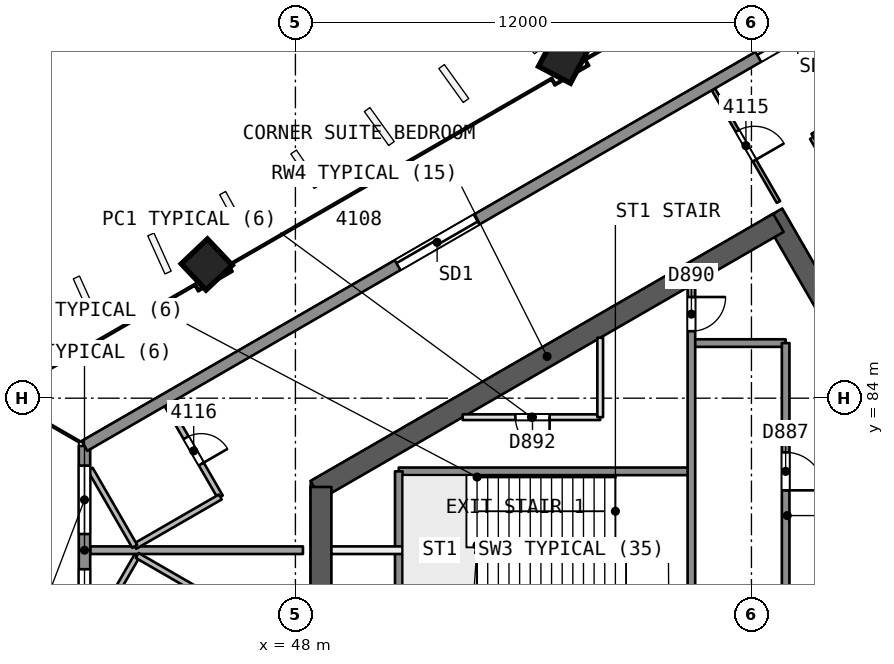
"""IFC4 building model, lengths in metres.
Left out: names, types, materials, properties, quantities, classifications, styles, units other than length and angle.
Written with IfcOpenShell. Run it as: python <this file> out.ifc"""

import sys

from ifc_helpers import new_model, si_unit, direction, frame, frame_2d, origin, origin_2d, place, context, subcontext, project, spatial, rectangle, extrude, element, fill, save


model = new_model("IFC4")
c1 = context("Model", 3, precision=1e-05, world=origin(), true_north=direction((0.0, 1.0)))
c2 = subcontext(c1, "Body", "Model", "MODEL_VIEW")
j1 = project(units=[si_unit("LENGTHUNIT", "METRE"), si_unit("PLANEANGLEUNIT", "RADIAN")], contexts=[c1])
p1 = place(None, origin())
s1 = spatial("IfcSite", under=j1, at=p1, CompositionType="ELEMENT")
p2 = place(p1, origin())
s2 = spatial("IfcBuilding", under=s1, at=p2, CompositionType="ELEMENT")
p3 = place(p2, frame((0.0, 0.0, 171.1)))
s3 = spatial("IfcBuildingStorey", under=s2, at=p3, CompositionType="ELEMENT", Elevation=171.1)
p4 = place(p3, frame((65.682, 80.0, 0.0), z_axis=(0.0, 0.0, 1.0), x_axis=(-0.500000202252, 0.866025287014, 0.0)))
e1 = element("IfcWall", 1, at=p4, inside=s3, PredefinedType="SHEAR", context=c2, shape_type="SweptSolid", body=[
    extrude(rectangle(XDim=10.221, YDim=0.55, at=frame_2d((5.111, 0.0))), origin(), (0.0, 0.0, 1.0), 3.7),
])
p5 = place(p4, frame((0.791, 0.0, 0.0)))
e2 = element("IfcOpeningElement", 2, at=p5, cuts=e1, PredefinedType="OPENING", context=c2, shape_type="SweptSolid", body=[
    extrude(rectangle(XDim=1.2, YDim=2.1, at=frame_2d((0.6, 1.05))), frame((0.0, 0.286, 0.0), z_axis=(0.0, -1.0, 0.0), x_axis=(1.0, 0.0, 0.0)), (0.0, 0.0, 1.0), 0.571),
])
p6 = place(p3, frame((60.709, 88.614, 0.0), z_axis=(0.0, 0.0, 1.0), x_axis=(-0.866020164116, -0.500009075263, 0.0)))
e3 = element("IfcWall", 3, at=p6, inside=s3, PredefinedType="SHEAR", context=c2, shape_type="SweptSolid", body=[
    extrude(rectangle(XDim=14.058, YDim=0.55, at=frame_2d((7.029, 0.0))), origin(), (0.0, 0.0, 1.0), 3.7),
])
p7 = place(p3, frame((48.672, 81.664, 0.0), z_axis=(0.0, 0.0, 1.0), x_axis=(0.0, -1.0, 0.0)))
e4 = element("IfcWall", 4, at=p7, inside=s3, PredefinedType="SHEAR", context=c2, shape_type="SweptSolid", body=[
    extrude(rectangle(XDim=3.487, YDim=0.55, at=frame_2d((1.743, 0.0))), origin(), (0.0, 0.0, 1.0), 3.7),
])
p8 = place(p3, frame((60.709, 71.386, 0.0), z_axis=(0.0, 0.0, 1.0), x_axis=(0.500015938302, 0.866016201606, 0.0)))
e5 = element("IfcWall", 5, at=p8, inside=s3, PredefinedType="SHEAR", context=c2, shape_type="SweptSolid", body=[
    extrude(rectangle(XDim=10.105, YDim=0.55, at=frame_2d((5.053, 0.0))), origin(), (0.0, 0.0, 1.0), 3.7),
])
p9 = place(p8, frame((7.955, 0.0, 0.0)))
e6 = element("IfcOpeningElement", 6, at=p9, cuts=e5, PredefinedType="OPENING", context=c2, shape_type="SweptSolid", body=[
    extrude(rectangle(XDim=1.2, YDim=2.1, at=frame_2d((0.6, 1.05))), frame((0.0, 0.286, 0.0), z_axis=(0.0, -1.0, 0.0), x_axis=(1.0, 0.0, 0.0)), (0.0, 0.0, 1.0), 0.571),
])
p10 = place(p3, frame((55.016, 92.943, 0.0), z_axis=(0.019328501455, -0.012204002625, 0.999738701537), x_axis=(-0.498087889239, 0.866890953389, 0.020212113357)))
e7 = element("IfcColumn", 7, at=p10, inside=s3, PredefinedType="COLUMN", context=c2, shape_type="SweptSolid", body=[
    extrude(rectangle(XDim=0.95, YDim=0.95, at=origin_2d()), origin(), (0.0, 0.0, 1.0), 3.701),
])
p11 = place(p3, frame((45.632, 87.526, 0.0), z_axis=(0.02855911485, -0.006793507689, 0.999569019734), x_axis=(-0.500407643461, 0.865554709988, 0.020180049142)))
e8 = element("IfcColumn", 8, at=p11, inside=s3, PredefinedType="COLUMN", context=c2, shape_type="SweptSolid", body=[
    extrude(rectangle(XDim=0.95, YDim=0.95, at=origin_2d()), origin(), (0.0, 0.0, 1.0), 3.702),
])
p12 = place(p3, frame((58.999, 92.126, 0.0), z_axis=(0.0, 0.0, 1.0), x_axis=(0.499981725576, -0.866035954271, 0.0)))
e9 = element("IfcWall", 9, at=p12, inside=s3, PredefinedType="PARTITIONING", context=c2, shape_type="SweptSolid", body=[
    extrude(rectangle(XDim=3.424, YDim=0.1, at=frame_2d((1.712, 0.0))), origin(), (0.0, 0.0, 1.0), 3.25),
])
p13 = place(p12, frame((1.262, 0.0, 0.0)))
e10 = element("IfcOpeningElement", 10, at=p13, cuts=e9, PredefinedType="OPENING", context=c2, shape_type="SweptSolid", body=[
    extrude(rectangle(XDim=0.9, YDim=2.1, at=frame_2d((0.45, 1.05))), frame((0.0, 0.061, 0.0), z_axis=(0.0, -1.0, 0.0), x_axis=(1.0, 0.0, 0.0)), (0.0, 0.0, 1.0), 0.121),
])
p14 = place(p3, frame((66.129, 83.077, 0.0), z_axis=(0.0, 0.0, 1.0), x_axis=(-0.5000018851, 0.866024315419, 0.0)))
e11 = element("IfcWall", 11, at=p14, inside=s3, PredefinedType="PARTITIONING", context=c2, shape_type="SweptSolid", body=[
    extrude(rectangle(XDim=9.0, YDim=0.2, at=frame_2d((4.5, 0.0))), origin(), (0.0, 0.0, 1.0), 3.25),
])
p15 = place(p3, frame((61.629, 90.871, 0.0), z_axis=(0.0, 0.0, 1.0), x_axis=(0.866041268327, 0.499972520799, 0.0)))
e12 = element("IfcWall", 12, at=p15, inside=s3, PredefinedType="PARTITIONING", context=c2, shape_type="SweptSolid", body=[
    extrude(rectangle(XDim=2.0, YDim=0.2, at=frame_2d((1.0, 0.0))), origin(), (0.0, 0.0, 1.0), 3.25),
])
p16 = place(p3, frame((44.623, 83.826, 0.0), z_axis=(0.0, 0.0, 1.0), x_axis=(0.500001639361, -0.866024457297, 0.0)))
e13 = element("IfcWall", 13, at=p16, inside=s3, PredefinedType="PARTITIONING", context=c2, shape_type="SweptSolid", body=[
    extrude(rectangle(XDim=2.801, YDim=0.15, at=frame_2d((1.4, 0.0))), origin(), (0.0, 0.0, 1.0), 3.25),
])
p17 = place(p16, frame((1.0, 0.0, 0.0)))
e14 = element("IfcOpeningElement", 14, at=p17, cuts=e13, PredefinedType="OPENING", context=c2, shape_type="SweptSolid", body=[
    extrude(rectangle(XDim=0.8, YDim=2.1, at=frame_2d((0.4, 1.05))), frame((0.0, 0.085, 0.0), z_axis=(0.0, -1.0, 0.0), x_axis=(1.0, 0.0, 0.0)), (0.0, 0.0, 1.0), 0.171),
])
p18 = place(p3, frame((46.023, 81.401, 0.0), z_axis=(0.0, 0.0, 1.0), x_axis=(-0.866021400173, -0.500006934395, 0.0)))
e15 = element("IfcWall", 15, at=p18, inside=s3, PredefinedType="PARTITIONING", context=c2, shape_type="SweptSolid", body=[
    extrude(rectangle(XDim=2.6, YDim=0.15, at=frame_2d((1.3, 0.0))), origin(), (0.0, 0.0, 1.0), 3.25),
])
p19 = place(p3, frame((43.771, 80.101, 0.0), z_axis=(0.0, 0.0, 1.0), x_axis=(-0.499989728273, 0.866031334088, 0.0)))
e16 = element("IfcWall", 16, at=p19, inside=s3, PredefinedType="PARTITIONING", context=c2, shape_type="SweptSolid", body=[
    extrude(rectangle(XDim=2.346, YDim=0.15, at=frame_2d((1.173, 0.0))), origin(), (0.0, 0.0, 1.0), 3.25),
])
p20 = place(p3, frame((42.599, 80.0, 0.0), z_axis=(0.0, 0.0, 1.0), x_axis=(1.0, 0.0, 0.0)))
e17 = element("IfcWall", 17, at=p20, inside=s3, PredefinedType="PARTITIONING", context=c2, shape_type="SweptSolid", body=[
    extrude(rectangle(XDim=5.599, YDim=0.2, at=frame_2d((2.8, 0.0))), origin(), (0.0, 0.0, 1.0), 3.25),
])
p21 = place(p3, frame((42.599, 77.718, 0.0), z_axis=(0.0, 0.0, 1.0), x_axis=(0.499978546328, 0.866037789714, 0.0)))
e18 = element("IfcWall", 18, at=p21, inside=s3, PredefinedType="PARTITIONING", context=c2, shape_type="SweptSolid", body=[
    extrude(rectangle(XDim=2.476, YDim=0.15, at=frame_2d((1.238, 0.0))), origin(), (0.0, 0.0, 1.0), 3.25),
])
p22 = place(p3, frame((43.836, 79.862, 0.0), z_axis=(0.0, 0.0, 1.0), x_axis=(0.866021400173, -0.500006934395, 0.0)))
e19 = element("IfcWall", 19, at=p22, inside=s3, PredefinedType="PARTITIONING", context=c2, shape_type="SweptSolid", body=[
    extrude(rectangle(XDim=2.6, YDim=0.15, at=frame_2d((1.3, 0.0))), origin(), (0.0, 0.0, 1.0), 3.25),
])
p23 = place(p3, frame((42.45, 77.256, 0.0), z_axis=(0.0, 0.0, 1.0), x_axis=(0.0, 1.0, 0.0)))
e20 = element("IfcWall", 20, at=p23, inside=s3, PredefinedType="SOLIDWALL", context=c2, shape_type="SweptSolid", body=[
    extrude(rectangle(XDim=5.487, YDim=0.3, at=frame_2d((2.744, 0.0))), origin(), (0.0, 0.0, 1.0), 3.25),
])
p24 = place(p23, frame((3.169, 0.0, 0.9)))
e21 = element("IfcOpeningElement", 21, at=p24, cuts=e20, PredefinedType="OPENING", context=c2, shape_type="SweptSolid", body=[
    extrude(rectangle(XDim=1.8, YDim=1.5, at=frame_2d((0.9, 0.75))), frame((0.0, 0.161, 0.0), z_axis=(0.0, -1.0, 0.0), x_axis=(1.0, 0.0, 0.0)), (0.0, 0.0, 1.0), 0.321),
])
p25 = place(p23, frame((0.443, 0.0, 0.9)))
e22 = element("IfcOpeningElement", 22, at=p25, cuts=e20, PredefinedType="OPENING", context=c2, shape_type="SweptSolid", body=[
    extrude(rectangle(XDim=1.8, YDim=1.5, at=frame_2d((0.9, 0.75))), frame((0.0, 0.161, 0.0), z_axis=(0.0, -1.0, 0.0), x_axis=(1.0, 0.0, 0.0)), (0.0, 0.0, 1.0), 0.321),
])
p26 = place(p3, frame((42.45, 82.744, 0.0), z_axis=(0.0, 0.0, 1.0), x_axis=(0.866024128163, 0.500002209434, 0.0)))
e23 = element("IfcWall", 23, at=p26, inside=s3, PredefinedType="SOLIDWALL", context=c2, shape_type="SweptSolid", body=[
    extrude(rectangle(XDim=53.635, YDim=0.3, at=frame_2d((26.817, 0.0))), origin(), (0.0, 0.0, 1.0), 3.25),
])
p27 = place(p26, frame((20.473, 0.0, 0.0)))
e24 = element("IfcOpeningElement", 24, at=p27, cuts=e23, PredefinedType="OPENING", context=c2, shape_type="SweptSolid", body=[
    extrude(rectangle(XDim=2.4, YDim=2.4, at=frame_2d((1.2, 1.2))), frame((0.0, 0.161, 0.0), z_axis=(0.0, -1.0, 0.0), x_axis=(1.0, 0.0, 0.0)), (0.0, 0.0, 1.0), 0.321),
])
p28 = place(p26, frame((9.514, 0.0, 0.0)))
e25 = element("IfcOpeningElement", 25, at=p28, cuts=e23, PredefinedType="OPENING", context=c2, shape_type="SweptSolid", body=[
    extrude(rectangle(XDim=2.4, YDim=2.4, at=frame_2d((1.2, 1.2))), frame((0.0, 0.161, 0.0), z_axis=(0.0, -1.0, 0.0), x_axis=(1.0, 0.0, 0.0)), (0.0, 0.0, 1.0), 0.321),
])
p29 = place(p26, frame((40.628, 0.0, 0.0)))
e26 = element("IfcOpeningElement", 26, at=p29, cuts=e23, PredefinedType="OPENING", context=c2, shape_type="SweptSolid", body=[
    extrude(rectangle(XDim=2.4, YDim=2.4, at=frame_2d((1.2, 1.2))), frame((0.0, 0.161, 0.0), z_axis=(0.0, -1.0, 0.0), x_axis=(1.0, 0.0, 0.0)), (0.0, 0.0, 1.0), 0.321),
])
p30 = place(p26, frame((27.632, 0.0, 0.9)))
e27 = element("IfcOpeningElement", 27, at=p30, cuts=e23, PredefinedType="OPENING", context=c2, shape_type="SweptSolid", body=[
    extrude(rectangle(XDim=1.8, YDim=1.5, at=frame_2d((0.9, 0.75))), frame((0.0, 0.161, 0.0), z_axis=(0.0, -1.0, 0.0), x_axis=(1.0, 0.0, 0.0)), (0.0, 0.0, 1.0), 0.321),
])
p31 = place(p26, frame((24.826, 0.0, 0.9)))
e28 = element("IfcOpeningElement", 28, at=p31, cuts=e23, PredefinedType="OPENING", context=c2, shape_type="SweptSolid", body=[
    extrude(rectangle(XDim=1.8, YDim=1.5, at=frame_2d((0.9, 0.75))), frame((0.0, 0.161, 0.0), z_axis=(0.0, -1.0, 0.0), x_axis=(1.0, 0.0, 0.0)), (0.0, 0.0, 1.0), 0.321),
])
p32 = place(p3, frame((60.9, 85.45, 0.0), z_axis=(0.0, 0.0, 1.0), x_axis=(-1.0, 0.0, 0.0)))
e29 = element("IfcWall", 29, at=p32, inside=s3, PredefinedType="SOLIDWALL", context=c2, shape_type="SweptSolid", body=[
    extrude(rectangle(XDim=2.48, YDim=0.2, at=frame_2d((1.24, 0.0))), origin(), (0.0, 0.0, 1.0), 3.25),
])
p33 = place(p3, frame((56.02, 83.5, 0.0), z_axis=(0.0, 0.0, 1.0), x_axis=(-1.0, 0.0, 0.0)))
e30 = element("IfcWall", 30, at=p33, inside=s3, PredefinedType="PARTITIONING", context=c2, shape_type="SweptSolid", body=[
    extrude(rectangle(XDim=3.618, YDim=0.15, at=frame_2d((1.809, 0.0))), origin(), (0.0, 0.0, 1.0), 3.25),
])
p34 = place(p33, frame((1.332, 0.0, 0.0)))
e31 = element("IfcOpeningElement", 31, at=p34, cuts=e30, PredefinedType="OPENING", context=c2, shape_type="SweptSolid", body=[
    extrude(rectangle(XDim=0.9, YDim=2.1, at=frame_2d((0.45, 1.05))), frame((0.0, 0.085, 0.0), z_axis=(0.0, -1.0, 0.0), x_axis=(1.0, 0.0, 0.0)), (0.0, 0.0, 1.0), 0.171),
])
p35 = place(p3, frame((58.42, 82.075, 0.0), z_axis=(0.0, 0.0, 1.0), x_axis=(-1.0, 0.0, 0.0)))
e32 = element("IfcWall", 32, at=p35, inside=s3, PredefinedType="SOLIDWALL", context=c2, shape_type="SweptSolid", body=[
    extrude(rectangle(XDim=7.7, YDim=0.2, at=frame_2d((3.85, 0.0))), origin(), (0.0, 0.0, 1.0), 3.25),
])
p36 = place(p3, frame((50.82, 80.0, 0.0), z_axis=(0.0, 0.0, 1.0), x_axis=(-1.0, 0.0, 0.0)))
e33 = element("IfcWall", 33, at=p36, inside=s3, PredefinedType="PARTITIONING", context=c2, shape_type="SweptSolid", body=[
    extrude(rectangle(XDim=1.873, YDim=0.2, at=frame_2d((0.937, 0.0))), origin(), (0.0, 0.0, 1.0), 3.25),
])
p37 = place(p3, frame((60.9, 85.45, 0.0), z_axis=(0.0, 0.0, 1.0), x_axis=(0.0, -1.0, 0.0)))
e34 = element("IfcWall", 34, at=p37, inside=s3, PredefinedType="SOLIDWALL", context=c2, shape_type="SweptSolid", body=[
    extrude(rectangle(XDim=10.9, YDim=0.2, at=frame_2d((5.45, 0.0))), origin(), (0.0, 0.0, 1.0), 3.25),
])
p38 = place(p37, frame((2.875, 0.0, 0.0)))
e35 = element("IfcOpeningElement", 35, at=p38, cuts=e34, PredefinedType="OPENING", context=c2, shape_type="SweptSolid", body=[
    extrude(rectangle(XDim=1.0, YDim=2.1, at=frame_2d((0.5, 1.05))), frame((0.0, 0.11, 0.0), z_axis=(0.0, -1.0, 0.0), x_axis=(1.0, 0.0, 0.0)), (0.0, 0.0, 1.0), 0.221),
])
p39 = place(p37, frame((7.375, 0.0, 0.0)))
e36 = element("IfcOpeningElement", 36, at=p39, cuts=e34, PredefinedType="OPENING", context=c2, shape_type="SweptSolid", body=[
    extrude(rectangle(XDim=1.0, YDim=2.1, at=frame_2d((0.5, 1.05))), frame((0.0, 0.11, 0.0), z_axis=(0.0, -1.0, 0.0), x_axis=(1.0, 0.0, 0.0)), (0.0, 0.0, 1.0), 0.221),
])
p40 = place(p3, frame((58.42, 86.974, 0.0), z_axis=(0.0, 0.0, 1.0), x_axis=(0.0, -1.0, 0.0)))
e37 = element("IfcWall", 37, at=p40, inside=s3, PredefinedType="SOLIDWALL", context=c2, shape_type="SweptSolid", body=[
    extrude(rectangle(XDim=10.524, YDim=0.2, at=frame_2d((5.262, 0.0))), origin(), (0.0, 0.0, 1.0), 3.25),
])
p41 = place(p40, frame((0.312, 0.0, 0.0)))
e38 = element("IfcOpeningElement", 38, at=p41, cuts=e37, PredefinedType="OPENING", context=c2, shape_type="SweptSolid", body=[
    extrude(rectangle(XDim=0.9, YDim=2.1, at=frame_2d((0.45, 1.05))), frame((0.0, 0.11, 0.0), z_axis=(0.0, -1.0, 0.0), x_axis=(1.0, 0.0, 0.0)), (0.0, 0.0, 1.0), 0.221),
])
p42 = place(p3, frame((56.02, 85.589, 0.0), z_axis=(0.0, 0.0, 1.0), x_axis=(0.0, -1.0, 0.0)))
e39 = element("IfcWall", 39, at=p42, inside=s3, PredefinedType="PARTITIONING", context=c2, shape_type="SweptSolid", body=[
    extrude(rectangle(XDim=2.089, YDim=0.15, at=frame_2d((1.044, 0.0))), origin(), (0.0, 0.0, 1.0), 3.25),
])
p43 = place(p3, frame((50.72, 82.075, 0.0), z_axis=(0.0, 0.0, 1.0), x_axis=(0.0, -1.0, 0.0)))
e40 = element("IfcWall", 40, at=p43, inside=s3, PredefinedType="SOLIDWALL", context=c2, shape_type="SweptSolid", body=[
    extrude(rectangle(XDim=4.15, YDim=0.2, at=frame_2d((2.075, 0.0))), origin(), (0.0, 0.0, 1.0), 3.25),
])
p44 = place(p13, origin())
e41 = element("IfcDoor", 41, at=p44, inside=s3, OperationType="SINGLE_SWING_RIGHT", PredefinedType="NOTDEFINED", context=c2, shape_type="SweptSolid", body=[
    extrude(rectangle(XDim=0.9, YDim=2.1, at=frame_2d((0.45, 1.05))), frame((0.0, 0.025, 0.0), z_axis=(0.0, -1.0, 0.0), x_axis=(1.0, 0.0, 0.0)), (0.0, 0.0, 1.0), 0.05),
])
fill(e10, e41)
p45 = place(p17, origin())
e42 = element("IfcDoor", 42, at=p45, inside=s3, OperationType="SINGLE_SWING_RIGHT", PredefinedType="NOTDEFINED", context=c2, shape_type="SweptSolid", body=[
    extrude(rectangle(XDim=0.8, YDim=2.1, at=frame_2d((0.4, 1.05))), frame((0.0, 0.025, 0.0), z_axis=(0.0, -1.0, 0.0), x_axis=(1.0, 0.0, 0.0)), (0.0, 0.0, 1.0), 0.05),
])
fill(e14, e42)
p46 = place(p24, origin())
e43 = element("IfcWindow", 43, at=p46, inside=s3, PartitioningType="SINGLE_PANEL", PredefinedType="WINDOW", context=c2, shape_type="SweptSolid", body=[
    extrude(rectangle(XDim=1.8, YDim=1.5, at=frame_2d((0.9, 0.75))), frame((0.0, 0.03, 0.0), z_axis=(0.0, -1.0, 0.0), x_axis=(1.0, 0.0, 0.0)), (0.0, 0.0, 1.0), 0.06),
])
fill(e21, e43)
p47 = place(p25, origin())
e44 = element("IfcWindow", 44, at=p47, inside=s3, PartitioningType="SINGLE_PANEL", PredefinedType="WINDOW", context=c2, shape_type="SweptSolid", body=[
    extrude(rectangle(XDim=1.8, YDim=1.5, at=frame_2d((0.9, 0.75))), frame((0.0, 0.03, 0.0), z_axis=(0.0, -1.0, 0.0), x_axis=(1.0, 0.0, 0.0)), (0.0, 0.0, 1.0), 0.06),
])
fill(e22, e44)
p48 = place(p27, origin())
e45 = element("IfcDoor", 45, at=p48, inside=s3, OperationType="SLIDING_TO_LEFT", PredefinedType="NOTDEFINED", context=c2, shape_type="SweptSolid", body=[
    extrude(rectangle(XDim=2.4, YDim=2.4, at=frame_2d((1.2, 1.2))), frame((0.0, 0.025, 0.0), z_axis=(0.0, -1.0, 0.0), x_axis=(1.0, 0.0, 0.0)), (0.0, 0.0, 1.0), 0.05),
])
fill(e24, e45)
p49 = place(p28, origin())
e46 = element("IfcDoor", 46, at=p49, inside=s3, OperationType="SLIDING_TO_RIGHT", PredefinedType="NOTDEFINED", context=c2, shape_type="SweptSolid", body=[
    extrude(rectangle(XDim=2.4, YDim=2.4, at=frame_2d((1.2, 1.2))), frame((0.0, 0.025, 0.0), z_axis=(0.0, -1.0, 0.0), x_axis=(1.0, 0.0, 0.0)), (0.0, 0.0, 1.0), 0.05),
])
fill(e25, e46)
p50 = place(p38, origin())
e47 = element("IfcDoor", 47, at=p50, inside=s3, OperationType="SINGLE_SWING_RIGHT", PredefinedType="NOTDEFINED", context=c2, shape_type="SweptSolid", body=[
    extrude(rectangle(XDim=1.0, YDim=2.1, at=frame_2d((0.5, 1.05))), frame((0.0, 0.025, 0.0), z_axis=(0.0, -1.0, 0.0), x_axis=(1.0, 0.0, 0.0)), (0.0, 0.0, 1.0), 0.05),
])
fill(e35, e47)
p51 = place(p41, origin())
e48 = element("IfcDoor", 48, at=p51, inside=s3, OperationType="SINGLE_SWING_LEFT", PredefinedType="NOTDEFINED", context=c2, shape_type="SweptSolid", body=[
    extrude(rectangle(XDim=0.9, YDim=2.1, at=frame_2d((0.45, 1.05))), frame((0.0, 0.025, 0.0), z_axis=(0.0, -1.0, 0.0), x_axis=(1.0, 0.0, 0.0)), (0.0, 0.0, 1.0), 0.05),
])
fill(e38, e48)
p52 = place(p34, origin())
e49 = element("IfcDoor", 49, at=p52, inside=s3, OperationType="SINGLE_SWING_LEFT", PredefinedType="NOTDEFINED", context=c2, shape_type="SweptSolid", body=[
    extrude(rectangle(XDim=0.9, YDim=2.1, at=frame_2d((0.45, 1.05))), frame((0.0, 0.025, 0.0), z_axis=(0.0, -1.0, 0.0), x_axis=(1.0, 0.0, 0.0)), (0.0, 0.0, 1.0), 0.05),
])
fill(e31, e49)
save(model, sys.argv[1])
